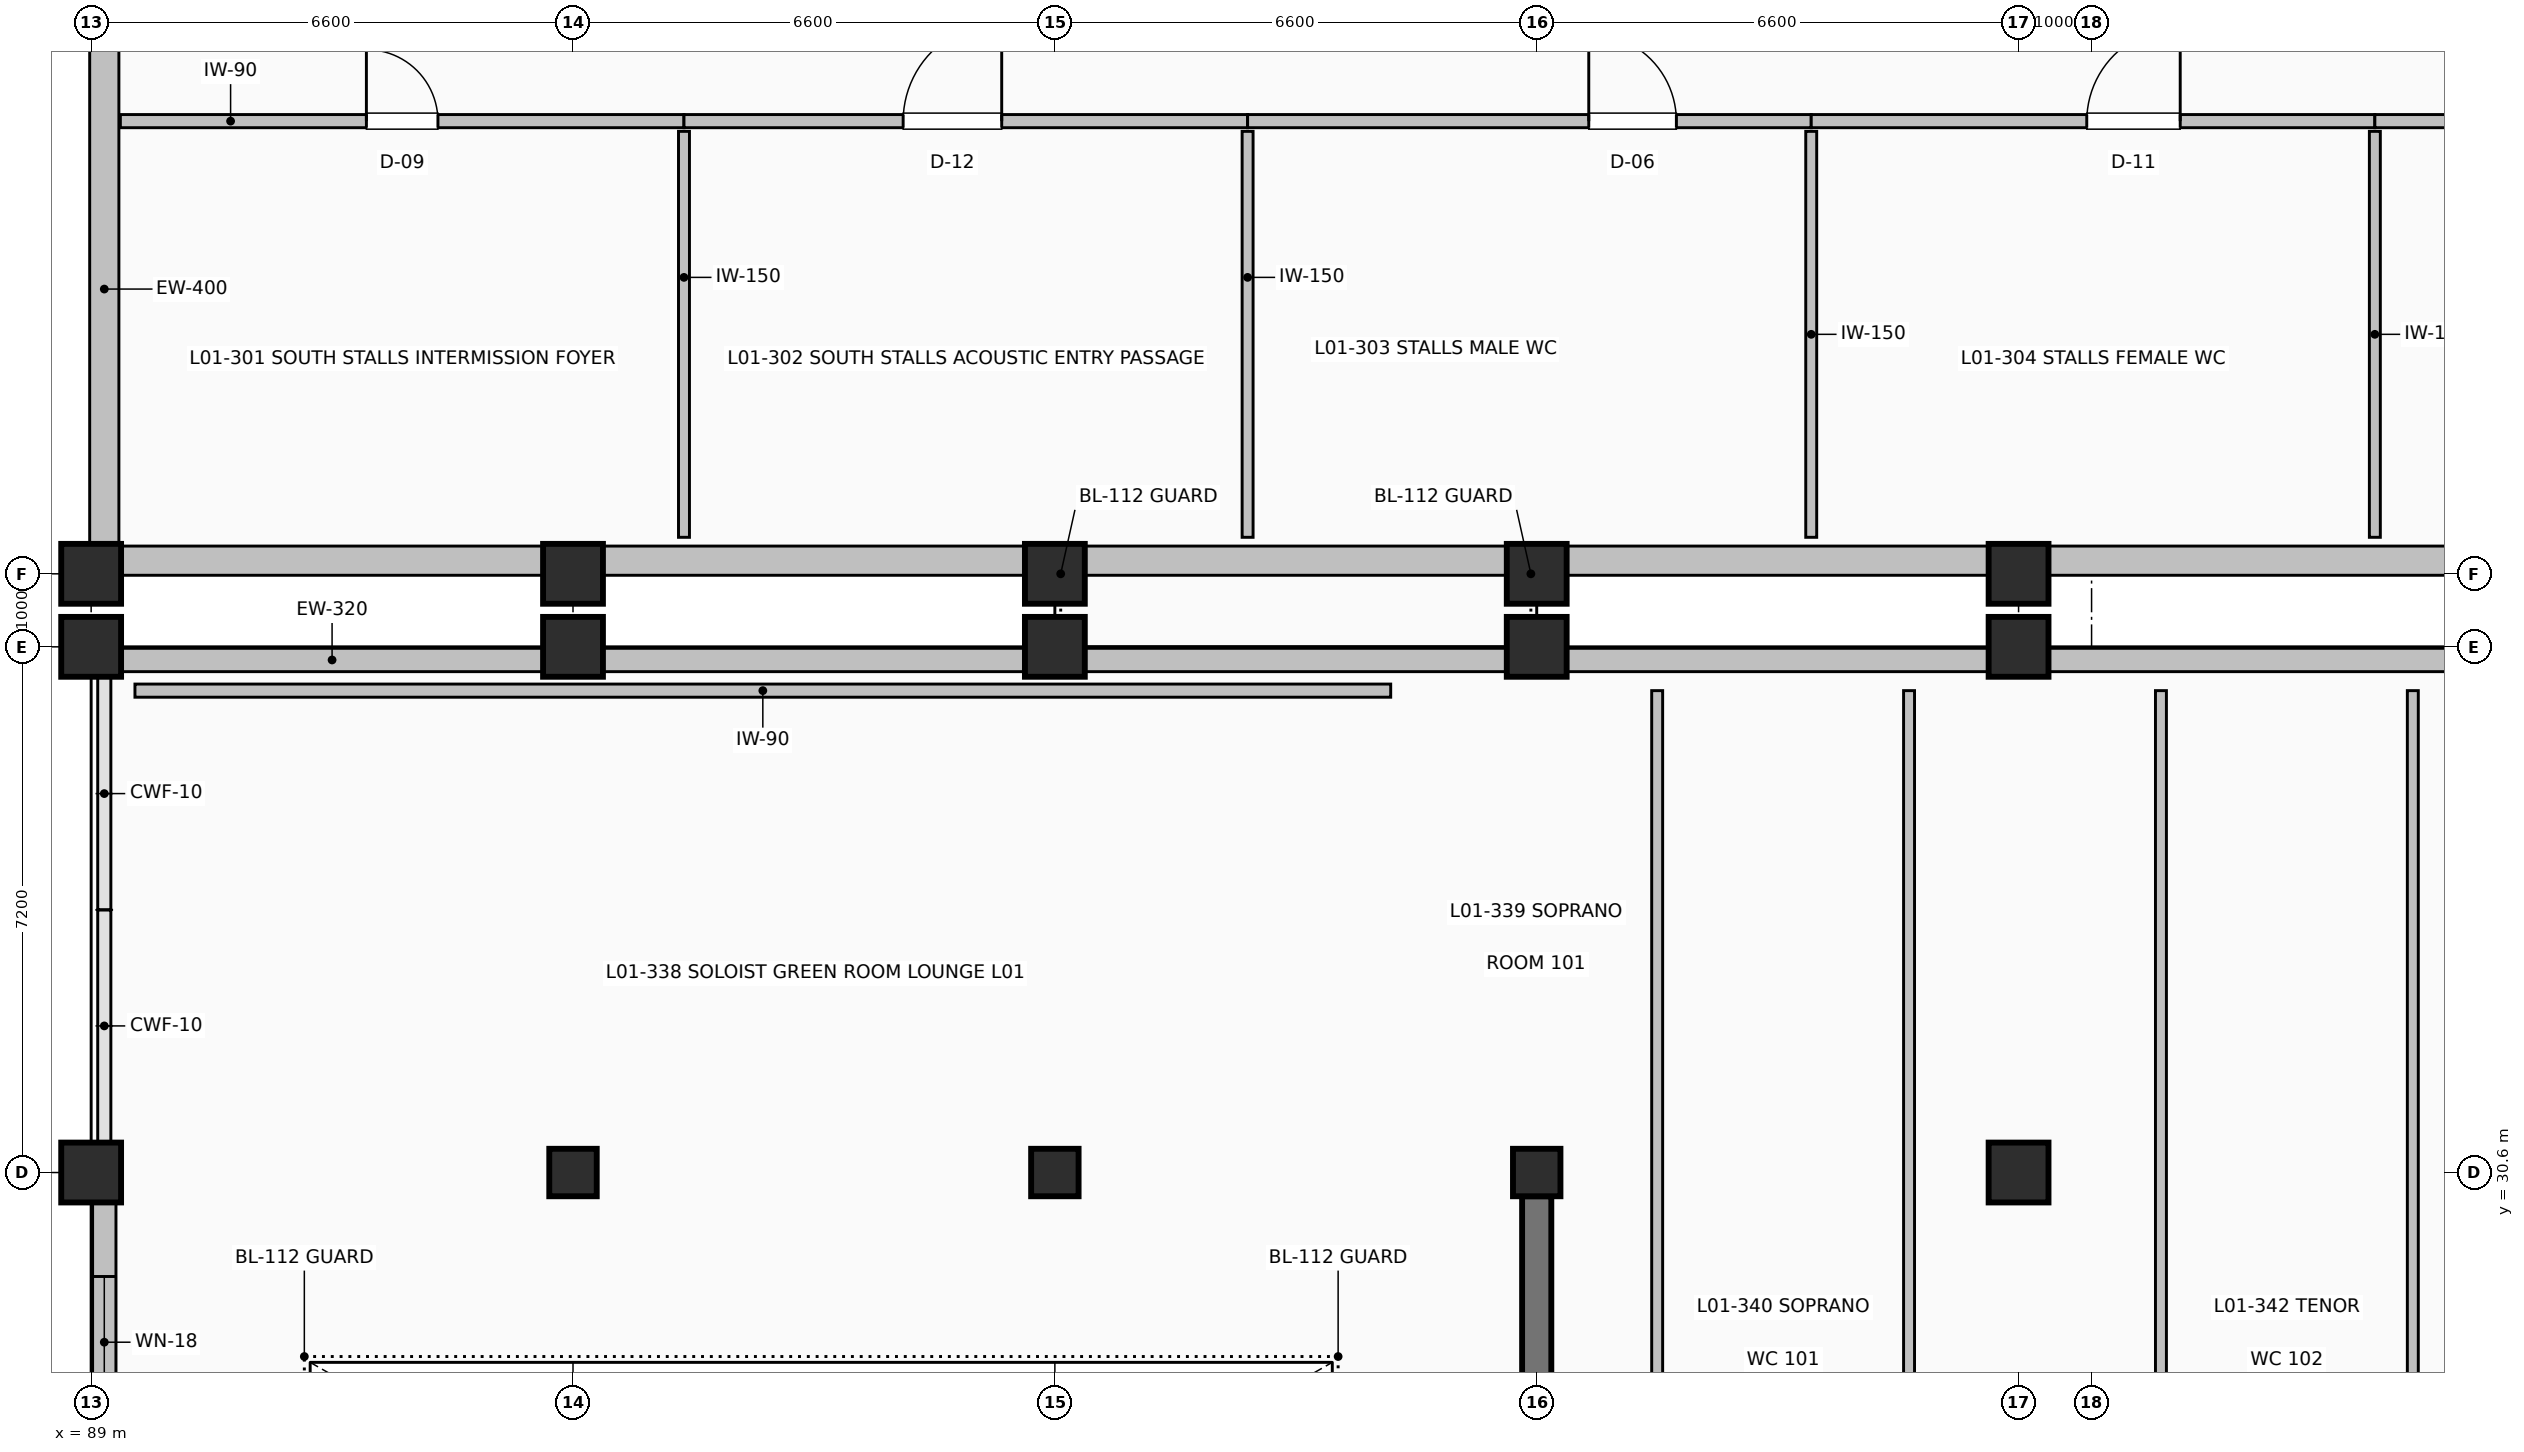
"""IFC4 building model, lengths in metres.
Left out: names, types, materials, properties, quantities, classifications, styles, units other than length and angle.
Written with IfcOpenShell. Run it as: python <this file> out.ifc"""

import sys

from ifc_helpers import new_model, si_unit, direction, frame, frame_2d, origin, origin_2d, place, context, subcontext, project, spatial, rectangle, extrude, element, fill, save


model = new_model("IFC4")
c1 = context("Model", 3, precision=1e-05, world=origin(), true_north=direction((0.0, 1.0)))
c2 = subcontext(c1, "Body", "Model", "MODEL_VIEW")
j1 = project(units=[si_unit("LENGTHUNIT", "METRE"), si_unit("PLANEANGLEUNIT", "RADIAN")], contexts=[c1])
p1 = place(None, origin())
s1 = spatial("IfcSite", under=j1, at=p1, CompositionType="ELEMENT")
p2 = place(p1, origin())
s2 = spatial("IfcBuilding", under=s1, at=p2, CompositionType="ELEMENT")
p3 = place(p2, frame((0.0, 0.0, 5.4)))
s3 = spatial("IfcBuildingStorey", under=s2, at=p3, CompositionType="ELEMENT", Elevation=5.4)
for number, where, z_axis, x_axis in (
    (1, (89.0, 38.8, 0.0), (0.0, 0.0, 1.0), (1.0, 0.0, 0.0)),
    (2, (95.6, 38.8, 0.0), (0.0, 0.0, 1.0), (1.0, 0.0, 0.0)),
    (3, (102.2, 38.8, 0.0), (0.0, 0.0, 1.0), (1.0, 0.0, 0.0)),
    (4, (108.8, 38.8, 0.0), (0.0, 0.0, 1.0), (1.0, 0.0, 0.0)),
    (5, (115.4, 38.8, 0.0), (0.0, 0.0, 1.0), (1.0, 0.0, 0.0)),
    (6, (89.0, 30.6, 0.0), (0.0, 0.0, 1.0), (1.0, 0.0, 0.0)),
    (7, (89.0, 37.8, 0.0), (0.0, 0.0, 1.0), (1.0, 0.0, 0.0)),
):
    element("IfcColumn", number, at=place(p3, frame(where, z_axis=z_axis, x_axis=x_axis)), inside=s3, PredefinedType="COLUMN", context=c2, shape_type="SweptSolid", body=[
        extrude(rectangle(XDim=0.82, YDim=0.82, at=origin_2d()), origin(), (0.0, 0.0, 1.0), 4.8),
    ])
p4 = place(p3, frame((95.6, 30.6, 0.0), z_axis=(0.0, 0.0, 1.0), x_axis=(1.0, 0.0, 0.0)))
e8 = element("IfcColumn", 8, at=p4, inside=s3, PredefinedType="COLUMN", context=c2, shape_type="SweptSolid", body=[
    extrude(rectangle(XDim=0.65, YDim=0.65, at=origin_2d()), origin(), (0.0, 0.0, 1.0), 4.8),
])
p5 = place(p3, frame((95.6, 37.8, 0.0), z_axis=(0.0, 0.0, 1.0), x_axis=(1.0, 0.0, 0.0)))
e9 = element("IfcColumn", 9, at=p5, inside=s3, PredefinedType="COLUMN", context=c2, shape_type="SweptSolid", body=[
    extrude(rectangle(XDim=0.82, YDim=0.82, at=origin_2d()), origin(), (0.0, 0.0, 1.0), 4.8),
])
p6 = place(p3, frame((102.2, 30.6, 0.0), z_axis=(0.0, 0.0, 1.0), x_axis=(1.0, 0.0, 0.0)))
e10 = element("IfcColumn", 10, at=p6, inside=s3, PredefinedType="COLUMN", context=c2, shape_type="SweptSolid", body=[
    extrude(rectangle(XDim=0.65, YDim=0.65, at=origin_2d()), origin(), (0.0, 0.0, 1.0), 4.8),
])
p7 = place(p3, frame((102.2, 37.8, 0.0), z_axis=(0.0, 0.0, 1.0), x_axis=(1.0, 0.0, 0.0)))
e11 = element("IfcColumn", 11, at=p7, inside=s3, PredefinedType="COLUMN", context=c2, shape_type="SweptSolid", body=[
    extrude(rectangle(XDim=0.82, YDim=0.82, at=origin_2d()), origin(), (0.0, 0.0, 1.0), 4.8),
])
p8 = place(p3, frame((108.8, 30.6, 0.0), z_axis=(0.0, 0.0, 1.0), x_axis=(1.0, 0.0, 0.0)))
e12 = element("IfcColumn", 12, at=p8, inside=s3, PredefinedType="COLUMN", context=c2, shape_type="SweptSolid", body=[
    extrude(rectangle(XDim=0.65, YDim=0.65, at=origin_2d()), origin(), (0.0, 0.0, 1.0), 4.8),
])
for number, where, z_axis, x_axis in (
    (13, (108.8, 37.8, 0.0), (0.0, 0.0, 1.0), (1.0, 0.0, 0.0)),
    (14, (115.4, 30.6, 0.0), (0.0, 0.0, 1.0), (1.0, 0.0, 0.0)),
    (15, (115.4, 37.8, 0.0), (0.0, 0.0, 1.0), (1.0, 0.0, 0.0)),
):
    element("IfcColumn", number, at=place(p3, frame(where, z_axis=z_axis, x_axis=x_axis)), inside=s3, PredefinedType="COLUMN", context=c2, shape_type="SweptSolid", body=[
        extrude(rectangle(XDim=0.82, YDim=0.82, at=origin_2d()), origin(), (0.0, 0.0, 1.0), 4.8),
    ])
p9 = place(p3, frame((108.8, 23.725, 0.0), z_axis=(0.0, 0.0, 1.0), x_axis=(0.0, 1.0, 0.0)))
e16 = element("IfcWall", 16, at=p9, inside=s3, PredefinedType="SHEAR", context=c2, shape_type="SweptSolid", body=[
    extrude(rectangle(XDim=6.55, YDim=0.4, at=frame_2d((3.275, 0.0))), origin(), (0.0, 0.0, 1.0), 4.48),
])
for number, where, z_axis, x_axis in (
    (17, (121.59, 38.98, 0.0), (0.0, 0.0, 1.0), (-1.0, 0.0, 0.0)),
    (18, (114.99, 38.98, 0.0), (0.0, 0.0, 1.0), (-1.0, 0.0, 0.0)),
):
    element("IfcWall", number, at=place(p3, frame(where, z_axis=z_axis, x_axis=x_axis)), inside=s3, PredefinedType="SOLIDWALL", context=c2, shape_type="SweptSolid", body=[
        extrude(rectangle(XDim=5.78, YDim=0.4, at=frame_2d((2.89, 0.0))), origin(), (0.0, 0.0, 1.0), 3.722),
    ])
p10 = place(p3, frame((108.39, 38.98, 0.0), z_axis=(0.0, 0.0, 1.0), x_axis=(-1.0, 0.0, 0.0)))
e19 = element("IfcWall", 19, at=p10, inside=s3, PredefinedType="SOLIDWALL", context=c2, shape_type="SweptSolid", body=[
    extrude(rectangle(XDim=5.78, YDim=0.4, at=frame_2d((2.89, 0.0))), origin(), (0.0, 0.0, 1.0), 3.722),
])
for number, where, z_axis, x_axis in (
    (20, (101.79, 38.98, 0.0), (0.0, 0.0, 1.0), (-1.0, 0.0, 0.0)),
    (21, (95.19, 38.98, 0.0), (0.0, 0.0, 1.0), (-1.0, 0.0, 0.0)),
):
    element("IfcWall", number, at=place(p3, frame(where, z_axis=z_axis, x_axis=x_axis)), inside=s3, PredefinedType="SOLIDWALL", context=c2, shape_type="SweptSolid", body=[
        extrude(rectangle(XDim=5.78, YDim=0.4, at=frame_2d((2.89, 0.0))), origin(), (0.0, 0.0, 1.0), 3.722),
    ])
p11 = place(p3, frame((89.18, 39.21, 0.0), z_axis=(0.0, 0.0, 1.0), x_axis=(0.0, 1.0, 0.0)))
e22 = element("IfcWall", 22, at=p11, inside=s3, PredefinedType="SOLIDWALL", context=c2, shape_type="SweptSolid", body=[
    extrude(rectangle(XDim=6.98, YDim=0.4, at=frame_2d((3.49, 0.0))), origin(), (0.0, 0.0, 1.0), 3.722),
])
for number, where, z_axis, x_axis in (
    (23, (89.41, 37.62, 0.0), (0.0, 0.0, 1.0), (1.0, 0.0, 0.0)),
    (24, (96.01, 37.62, 0.0), (0.0, 0.0, 1.0), (1.0, 0.0, 0.0)),
):
    element("IfcWall", number, at=place(p3, frame(where, z_axis=z_axis, x_axis=x_axis)), inside=s3, PredefinedType="SOLIDWALL", context=c2, shape_type="SweptSolid", body=[
        extrude(rectangle(XDim=5.78, YDim=0.32, at=frame_2d((2.89, 0.0))), origin(), (0.0, 0.0, 1.0), 3.742),
    ])
p12 = place(p3, frame((102.61, 37.62, 0.0), z_axis=(0.0, 0.0, 1.0), x_axis=(1.0, 0.0, 0.0)))
e25 = element("IfcWall", 25, at=p12, inside=s3, PredefinedType="SOLIDWALL", context=c2, shape_type="SweptSolid", body=[
    extrude(rectangle(XDim=5.78, YDim=0.32, at=frame_2d((2.89, 0.0))), origin(), (0.0, 0.0, 1.0), 3.742),
])
for number, where, z_axis, x_axis in (
    (26, (109.21, 37.62, 0.0), (0.0, 0.0, 1.0), (1.0, 0.0, 0.0)),
    (27, (115.81, 37.62, 0.0), (0.0, 0.0, 1.0), (1.0, 0.0, 0.0)),
):
    element("IfcWall", number, at=place(p3, frame(where, z_axis=z_axis, x_axis=x_axis)), inside=s3, PredefinedType="SOLIDWALL", context=c2, shape_type="SweptSolid", body=[
        extrude(rectangle(XDim=5.78, YDim=0.32, at=frame_2d((2.89, 0.0))), origin(), (0.0, 0.0, 1.0), 3.742),
    ])
p13 = place(p3, frame((89.18, 23.81, 0.0), z_axis=(0.0, 0.0, 1.0), x_axis=(0.0, 1.0, 0.0)))
e28 = element("IfcWall", 28, at=p13, inside=s3, PredefinedType="SOLIDWALL", context=c2, shape_type="SweptSolid", body=[
    extrude(rectangle(XDim=6.38, YDim=0.32, at=frame_2d((3.19, 0.0))), origin(), (0.0, 0.0, 1.0), 3.742),
])
p14 = place(p13, frame((1.014, 0.0, 1.0)))
e29 = element("IfcOpeningElement", 29, at=p14, cuts=e28, PredefinedType="OPENING", context=c2, shape_type="SweptSolid", body=[
    extrude(rectangle(XDim=1.8, YDim=1.7, at=frame_2d((0.9, 0.85))), frame((0.0, 0.17, 0.0), z_axis=(0.0, -1.0, 0.0), x_axis=(1.0, 0.0, 0.0)), (0.0, 0.0, 1.0), 0.34),
])
p15 = place(p13, frame((3.566, 0.0, 1.0)))
e30 = element("IfcOpeningElement", 30, at=p15, cuts=e28, PredefinedType="OPENING", context=c2, shape_type="SweptSolid", body=[
    extrude(rectangle(XDim=1.8, YDim=1.7, at=frame_2d((0.9, 0.85))), frame((0.0, 0.17, 0.0), z_axis=(0.0, -1.0, 0.0), x_axis=(1.0, 0.0, 0.0)), (0.0, 0.0, 1.0), 0.34),
])
p16 = place(p3, frame((89.4, 45.0, 0.0), z_axis=(0.0, 0.0, 1.0), x_axis=(1.0, 0.0, 0.0)))
e31 = element("IfcWall", 31, at=p16, inside=s3, PredefinedType="PARTITIONING", context=c2, shape_type="SweptSolid", body=[
    extrude(rectangle(XDim=7.72, YDim=0.18, at=frame_2d((3.86, 0.0))), origin(), (0.0, 0.0, 1.0), 4.472),
])
p17 = place(p16, frame((3.37, 0.0, 0.0)))
e32 = element("IfcOpeningElement", 32, at=p17, cuts=e31, PredefinedType="OPENING", context=c2, shape_type="SweptSolid", body=[
    extrude(rectangle(XDim=0.98, YDim=2.08, at=frame_2d((0.49, 1.04))), frame((0.0, 0.1, 0.0), z_axis=(0.0, -1.0, 0.0), x_axis=(1.0, 0.0, 0.0)), (0.0, 0.0, 1.0), 0.2),
])
p18 = place(p3, frame((97.12, 39.3, 0.0), z_axis=(0.0, 0.0, 1.0), x_axis=(0.0, 1.0, 0.0)))
e33 = element("IfcWall", 33, at=p18, inside=s3, PredefinedType="PARTITIONING", context=c2, shape_type="SweptSolid", body=[
    extrude(rectangle(XDim=5.56, YDim=0.15, at=frame_2d((2.78, 0.0))), origin(), (0.0, 0.0, 1.0), 4.472),
])
p19 = place(p3, frame((97.12, 45.0, 0.0), z_axis=(0.0, 0.0, 1.0), x_axis=(1.0, 0.0, 0.0)))
e34 = element("IfcWall", 34, at=p19, inside=s3, PredefinedType="PARTITIONING", context=c2, shape_type="SweptSolid", body=[
    extrude(rectangle(XDim=7.72, YDim=0.18, at=frame_2d((3.86, 0.0))), origin(), (0.0, 0.0, 1.0), 4.472),
])
p20 = place(p19, frame((3.002, 0.0, 0.0)))
e35 = element("IfcOpeningElement", 35, at=p20, cuts=e34, PredefinedType="OPENING", context=c2, shape_type="SweptSolid", body=[
    extrude(rectangle(XDim=1.35, YDim=2.16, at=frame_2d((0.675, 1.08))), frame((0.0, 0.1, 0.0), z_axis=(0.0, -1.0, 0.0), x_axis=(1.0, 0.0, 0.0)), (0.0, 0.0, 1.0), 0.2),
])
p21 = place(p3, frame((104.84, 39.3, 0.0), z_axis=(0.0, 0.0, 1.0), x_axis=(0.0, 1.0, 0.0)))
e36 = element("IfcWall", 36, at=p21, inside=s3, PredefinedType="PARTITIONING", context=c2, shape_type="SweptSolid", body=[
    extrude(rectangle(XDim=5.56, YDim=0.15, at=frame_2d((2.78, 0.0))), origin(), (0.0, 0.0, 1.0), 4.472),
])
p22 = place(p3, frame((104.84, 45.0, 0.0), z_axis=(0.0, 0.0, 1.0), x_axis=(1.0, 0.0, 0.0)))
e37 = element("IfcWall", 37, at=p22, inside=s3, PredefinedType="PARTITIONING", context=c2, shape_type="SweptSolid", body=[
    extrude(rectangle(XDim=7.72, YDim=0.18, at=frame_2d((3.86, 0.0))), origin(), (0.0, 0.0, 1.0), 4.472),
])
p23 = place(p22, frame((4.673, 0.0, 0.0)))
e38 = element("IfcOpeningElement", 38, at=p23, cuts=e37, PredefinedType="OPENING", context=c2, shape_type="SweptSolid", body=[
    extrude(rectangle(XDim=1.2, YDim=2.1, at=frame_2d((0.6, 1.05))), frame((0.0, 0.1, 0.0), z_axis=(0.0, -1.0, 0.0), x_axis=(1.0, 0.0, 0.0)), (0.0, 0.0, 1.0), 0.2),
])
p24 = place(p3, frame((112.56, 39.3, 0.0), z_axis=(0.0, 0.0, 1.0), x_axis=(0.0, 1.0, 0.0)))
e39 = element("IfcWall", 39, at=p24, inside=s3, PredefinedType="PARTITIONING", context=c2, shape_type="SweptSolid", body=[
    extrude(rectangle(XDim=5.56, YDim=0.15, at=frame_2d((2.78, 0.0))), origin(), (0.0, 0.0, 1.0), 4.472),
])
p25 = place(p3, frame((112.56, 45.0, 0.0), z_axis=(0.0, 0.0, 1.0), x_axis=(1.0, 0.0, 0.0)))
e40 = element("IfcWall", 40, at=p25, inside=s3, PredefinedType="PARTITIONING", context=c2, shape_type="SweptSolid", body=[
    extrude(rectangle(XDim=7.72, YDim=0.18, at=frame_2d((3.86, 0.0))), origin(), (0.0, 0.0, 1.0), 4.472),
])
p26 = place(p25, frame((3.774, 0.0, 0.0)))
e41 = element("IfcOpeningElement", 41, at=p26, cuts=e40, PredefinedType="OPENING", context=c2, shape_type="SweptSolid", body=[
    extrude(rectangle(XDim=1.28, YDim=2.14, at=frame_2d((0.64, 1.07))), frame((0.0, 0.1, 0.0), z_axis=(0.0, -1.0, 0.0), x_axis=(1.0, 0.0, 0.0)), (0.0, 0.0, 1.0), 0.2),
])
p27 = place(p3, frame((120.28, 39.3, 0.0), z_axis=(0.0, 0.0, 1.0), x_axis=(0.0, 1.0, 0.0)))
e42 = element("IfcWall", 42, at=p27, inside=s3, PredefinedType="PARTITIONING", context=c2, shape_type="SweptSolid", body=[
    extrude(rectangle(XDim=5.56, YDim=0.15, at=frame_2d((2.78, 0.0))), origin(), (0.0, 0.0, 1.0), 4.472),
])
p28 = place(p3, frame((120.28, 45.0, 0.0), z_axis=(0.0, 0.0, 1.0), x_axis=(1.0, 0.0, 0.0)))
e43 = element("IfcWall", 43, at=p28, inside=s3, PredefinedType="PARTITIONING", context=c2, shape_type="SweptSolid", body=[
    extrude(rectangle(XDim=7.72, YDim=0.18, at=frame_2d((3.86, 0.0))), origin(), (0.0, 0.0, 1.0), 4.472),
])
p29 = place(p28, frame((3.26, 0.0, 0.0)))
e44 = element("IfcOpeningElement", 44, at=p29, cuts=e43, PredefinedType="OPENING", context=c2, shape_type="SweptSolid", body=[
    extrude(rectangle(XDim=1.2, YDim=2.1, at=frame_2d((0.6, 1.05))), frame((0.0, 0.1, 0.0), z_axis=(0.0, -1.0, 0.0), x_axis=(1.0, 0.0, 0.0)), (0.0, 0.0, 1.0), 0.2),
])
p30 = place(p3, frame((89.6, 37.2, 0.0), z_axis=(0.0, 0.0, 1.0), x_axis=(1.0, 0.0, 0.0)))
e45 = element("IfcWall", 45, at=p30, inside=s3, PredefinedType="PARTITIONING", context=c2, shape_type="SweptSolid", body=[
    extrude(rectangle(XDim=17.2, YDim=0.18, at=frame_2d((8.6, 0.0))), origin(), (0.0, 0.0, 1.0), 4.492),
])
for number, where, z_axis, x_axis in (
    (46, (110.45, 18.34, 0.0), (0.0, 0.0, 1.0), (0.0, 1.0, 0.0)),
    (47, (113.9, 18.34, 0.0), (0.0, 0.0, 1.0), (0.0, 1.0, 0.0)),
    (48, (117.35, 18.34, 0.0), (0.0, 0.0, 1.0), (0.0, 1.0, 0.0)),
    (49, (120.8, 18.34, 0.0), (0.0, 0.0, 1.0), (0.0, 1.0, 0.0)),
):
    element("IfcWall", number, at=place(p3, frame(where, z_axis=z_axis, x_axis=x_axis)), inside=s3, PredefinedType="PARTITIONING", context=c2, shape_type="SweptSolid", body=[
        extrude(rectangle(XDim=18.86, YDim=0.15, at=frame_2d((9.43, 0.0))), origin(), (0.0, 0.0, 1.0), 4.492),
    ])
p31 = place(p15, origin())
e50 = element("IfcWindow", 50, at=p31, inside=s3, PartitioningType="SINGLE_PANEL", PredefinedType="WINDOW", context=c2, shape_type="SweptSolid", body=[
    extrude(rectangle(XDim=1.8, YDim=1.7, at=frame_2d((0.9, 0.85))), frame((0.0, 0.03, 0.0), z_axis=(0.0, -1.0, 0.0), x_axis=(1.0, 0.0, 0.0)), (0.0, 0.0, 1.0), 0.06),
])
fill(e30, e50)
p32 = place(p17, origin())
e51 = element("IfcDoor", 51, at=p32, inside=s3, OperationType="SINGLE_SWING_LEFT", PredefinedType="DOOR", context=c2, shape_type="SweptSolid", body=[
    extrude(rectangle(XDim=0.98, YDim=2.08, at=frame_2d((0.49, 1.04))), frame((0.0, 0.025, 0.0), z_axis=(0.0, -1.0, 0.0), x_axis=(1.0, 0.0, 0.0)), (0.0, 0.0, 1.0), 0.05),
])
fill(e32, e51)
p33 = place(p20, origin())
e52 = element("IfcDoor", 52, at=p33, inside=s3, OperationType="SINGLE_SWING_RIGHT", PredefinedType="DOOR", context=c2, shape_type="SweptSolid", body=[
    extrude(rectangle(XDim=1.35, YDim=2.16, at=frame_2d((0.675, 1.08))), frame((0.0, 0.025, 0.0), z_axis=(0.0, -1.0, 0.0), x_axis=(1.0, 0.0, 0.0)), (0.0, 0.0, 1.0), 0.05),
])
fill(e35, e52)
p34 = place(p23, origin())
e53 = element("IfcDoor", 53, at=p34, inside=s3, OperationType="SINGLE_SWING_LEFT", PredefinedType="DOOR", context=c2, shape_type="SweptSolid", body=[
    extrude(rectangle(XDim=1.2, YDim=2.1, at=frame_2d((0.6, 1.05))), frame((0.0, 0.025, 0.0), z_axis=(0.0, -1.0, 0.0), x_axis=(1.0, 0.0, 0.0)), (0.0, 0.0, 1.0), 0.05),
])
fill(e38, e53)
p35 = place(p26, origin())
e54 = element("IfcDoor", 54, at=p35, inside=s3, OperationType="SINGLE_SWING_RIGHT", PredefinedType="DOOR", context=c2, shape_type="SweptSolid", body=[
    extrude(rectangle(XDim=1.28, YDim=2.14, at=frame_2d((0.64, 1.07))), frame((0.0, 0.025, 0.0), z_axis=(0.0, -1.0, 0.0), x_axis=(1.0, 0.0, 0.0)), (0.0, 0.0, 1.0), 0.05),
])
fill(e41, e54)
save(model, sys.argv[1])
